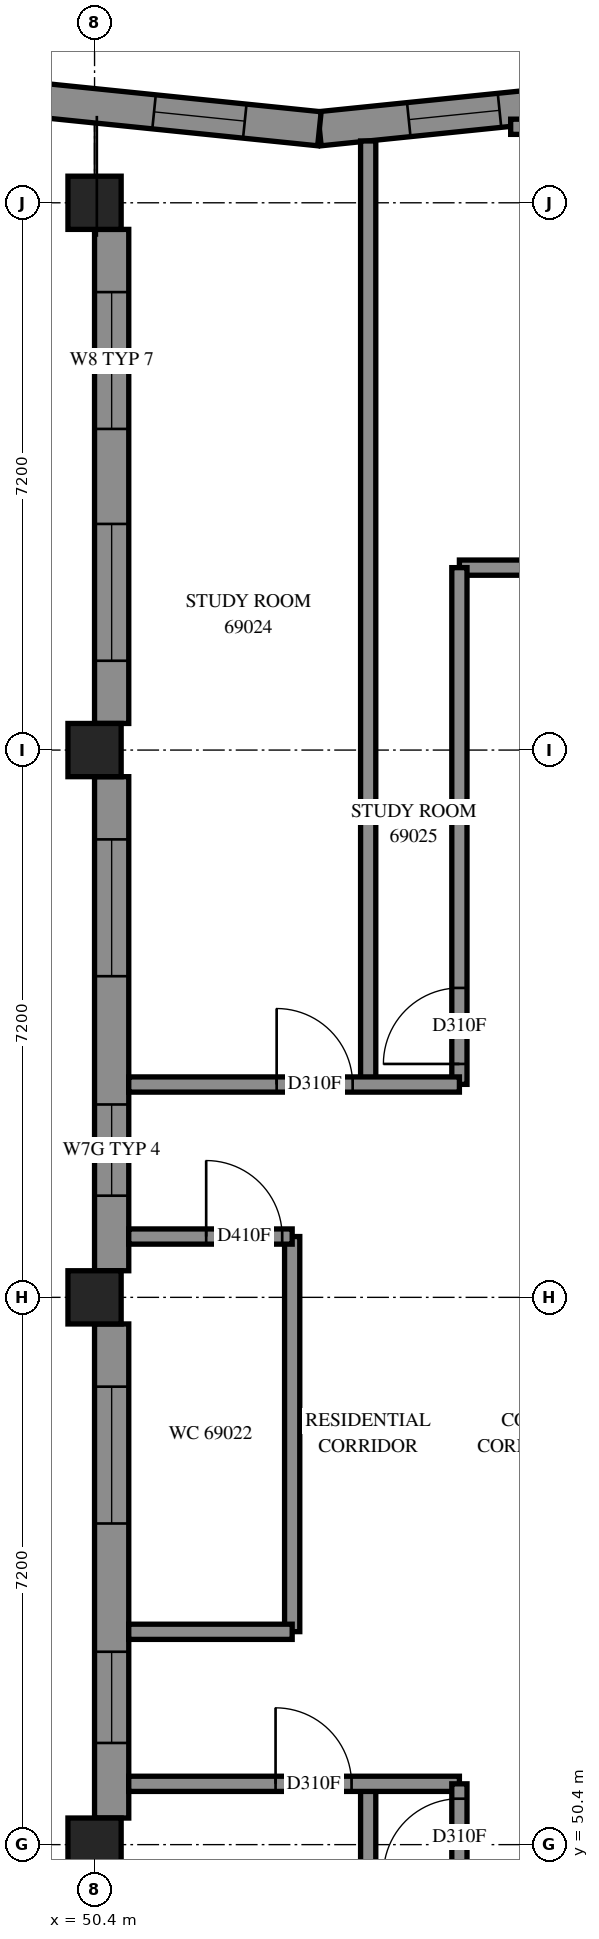
"""IFC4 building model, lengths in metres.
Left out: names, types, materials, properties, quantities, classifications, styles, units other than length and angle.
Written with IfcOpenShell. Run it as: python <this file> out.ifc"""

import sys

from ifc_helpers import new_model, si_unit, direction, frame, frame_2d, origin, origin_2d, place, context, subcontext, project, spatial, polyline, rectangle, outline, extrude, element, fill, save


model = new_model("IFC4")
c1 = context("Model", 3, precision=1e-05, world=origin(), true_north=direction((0.0, 1.0)))
c2 = subcontext(c1, "Body", "Model", "MODEL_VIEW")
j1 = project(units=[si_unit("LENGTHUNIT", "METRE"), si_unit("PLANEANGLEUNIT", "RADIAN")], contexts=[c1])
p1 = place(None, origin())
s1 = spatial("IfcSite", under=j1, at=p1, CompositionType="ELEMENT")
p2 = place(p1, origin())
s2 = spatial("IfcBuilding", under=s1, at=p2, CompositionType="ELEMENT")
p3 = place(p2, frame((0.0, 0.0, 254.0)))
s3 = spatial("IfcBuildingStorey", under=s2, at=p3, CompositionType="ELEMENT", Elevation=254.0)
for number, where, z_axis, x_axis in (
    (1, (50.4, 50.4, 0.0), (0.0, 0.0, 1.0), (1.0, 0.0, 0.0)),
    (2, (50.4, 57.6, 0.0), (0.0, 0.0, 1.0), (1.0, 0.0, 0.0)),
    (3, (50.4, 64.8, 0.0), (0.0, 0.0, 1.0), (1.0, 0.0, 0.0)),
    (4, (50.4, 72.0, 0.0), (0.0, 0.0, 1.0), (1.0, 0.0, 0.0)),
):
    element("IfcColumn", number, at=place(p3, frame(where, z_axis=z_axis, x_axis=x_axis)), inside=s3, PredefinedType="COLUMN", context=c2, shape_type="SweptSolid", body=[
        extrude(rectangle(XDim=0.7, YDim=0.7, at=origin_2d()), origin(), (0.0, 0.0, 1.0), 3.1),
    ])
p4 = place(p3, frame((57.18, 73.365, 0.0), z_axis=(0.0, 0.0, 1.0), x_axis=(-0.9948059356, -0.1017897367, 0.0)))
e5 = element("IfcWall", 5, at=p4, inside=s3, PredefinedType="SOLIDWALL", context=c2, shape_type="SweptSolid", body=[
    extrude(outline(polyline([(-0.023, -0.225), (3.818, -0.225), (3.864, 0.225), (0.023, 0.225), (-0.023, -0.225)])), origin(), (0.0, 0.0, 1.0), 3.1),
])
p5 = place(p4, frame((1.46, 0.0, 0.45)))
e6 = element("IfcOpeningElement", 6, at=p5, cuts=e5, PredefinedType="OPENING", context=c2, shape_type="SweptSolid", body=[
    extrude(rectangle(XDim=1.2, YDim=2.55, at=frame_2d((0.6, 1.275))), frame((0.0, 0.235, 0.0), z_axis=(0.0, -1.0, 0.0), x_axis=(1.0, 0.0, 0.0)), (0.0, 0.0, 1.0), 0.47),
])
p6 = place(p3, frame((53.358, 72.974, 0.0), z_axis=(0.0, 0.0, 1.0), x_axis=(-0.9948059356, 0.1017897367, 0.0)))
e7 = element("IfcWall", 7, at=p6, inside=s3, PredefinedType="SOLIDWALL", context=c2, shape_type="SweptSolid", body=[
    extrude(outline(polyline([(0.023, -0.225), (3.864, -0.225), (3.818, 0.225), (-0.023, 0.225), (0.023, -0.225)])), origin(), (0.0, 0.0, 1.0), 3.1),
])
p7 = place(p6, frame((0.987, 0.0, 0.45)))
e8 = element("IfcOpeningElement", 8, at=p7, cuts=e7, PredefinedType="OPENING", context=c2, shape_type="SweptSolid", body=[
    extrude(rectangle(XDim=1.2, YDim=2.55, at=frame_2d((0.6, 1.275))), frame((0.0, 0.235, 0.0), z_axis=(0.0, -1.0, 0.0), x_axis=(1.0, 0.0, 0.0)), (0.0, 0.0, 1.0), 0.47),
])
p8 = place(p3, frame((50.625, 71.65, 0.0), z_axis=(0.0, 0.0, 1.0), x_axis=(0.0, -1.0, 0.0)))
e9 = element("IfcWall", 9, at=p8, inside=s3, PredefinedType="SOLIDWALL", context=c2, shape_type="SweptSolid", body=[
    extrude(rectangle(XDim=6.5, YDim=0.45, at=frame_2d((3.25, 0.0))), origin(), (0.0, 0.0, 1.0), 3.1),
])
p9 = place(p8, frame((0.825, 0.0, 0.7)))
e10 = element("IfcOpeningElement", 10, at=p9, cuts=e9, PredefinedType="OPENING", context=c2, shape_type="SweptSolid", body=[
    extrude(rectangle(XDim=1.8, YDim=1.8, at=frame_2d((0.9, 0.9))), frame((0.0, 0.235, 0.0), z_axis=(0.0, -1.0, 0.0), x_axis=(1.0, 0.0, 0.0)), (0.0, 0.0, 1.0), 0.47),
])
p10 = place(p8, frame((3.875, 0.0, 0.7)))
e11 = element("IfcOpeningElement", 11, at=p10, cuts=e9, PredefinedType="OPENING", context=c2, shape_type="SweptSolid", body=[
    extrude(rectangle(XDim=1.8, YDim=1.8, at=frame_2d((0.9, 0.9))), frame((0.0, 0.235, 0.0), z_axis=(0.0, -1.0, 0.0), x_axis=(1.0, 0.0, 0.0)), (0.0, 0.0, 1.0), 0.47),
])
p11 = place(p3, frame((50.625, 64.45, 0.0), z_axis=(0.0, 0.0, 1.0), x_axis=(0.0, -1.0, 0.0)))
e12 = element("IfcWall", 12, at=p11, inside=s3, PredefinedType="SOLIDWALL", context=c2, shape_type="SweptSolid", body=[
    extrude(rectangle(XDim=6.5, YDim=0.45, at=frame_2d((3.25, 0.0))), origin(), (0.0, 0.0, 1.0), 3.1),
])
p12 = place(p11, frame((0.825, 0.0, 0.7)))
e13 = element("IfcOpeningElement", 13, at=p12, cuts=e12, PredefinedType="OPENING", context=c2, shape_type="SweptSolid", body=[
    extrude(rectangle(XDim=1.8, YDim=1.8, at=frame_2d((0.9, 0.9))), frame((0.0, 0.235, 0.0), z_axis=(0.0, -1.0, 0.0), x_axis=(1.0, 0.0, 0.0)), (0.0, 0.0, 1.0), 0.47),
])
p13 = place(p11, frame((4.312, 0.0, 0.6)))
e14 = element("IfcOpeningElement", 14, at=p13, cuts=e12, PredefinedType="OPENING", context=c2, shape_type="SweptSolid", body=[
    extrude(rectangle(XDim=1.2, YDim=1.9, at=frame_2d((0.6, 0.95))), frame((0.0, 0.235, 0.0), z_axis=(0.0, -1.0, 0.0), x_axis=(1.0, 0.0, 0.0)), (0.0, 0.0, 1.0), 0.47),
])
p14 = place(p3, frame((50.625, 57.25, 0.0), z_axis=(0.0, 0.0, 1.0), x_axis=(0.0, -1.0, 0.0)))
e15 = element("IfcWall", 15, at=p14, inside=s3, PredefinedType="SOLIDWALL", context=c2, shape_type="SweptSolid", body=[
    extrude(rectangle(XDim=6.5, YDim=0.45, at=frame_2d((3.25, 0.0))), origin(), (0.0, 0.0, 1.0), 3.1),
])
p15 = place(p14, frame((0.825, 0.0, 0.7)))
e16 = element("IfcOpeningElement", 16, at=p15, cuts=e15, PredefinedType="OPENING", context=c2, shape_type="SweptSolid", body=[
    extrude(rectangle(XDim=1.8, YDim=1.8, at=frame_2d((0.9, 0.9))), frame((0.0, 0.235, 0.0), z_axis=(0.0, -1.0, 0.0), x_axis=(1.0, 0.0, 0.0)), (0.0, 0.0, 1.0), 0.47),
])
p16 = place(p14, frame((4.312, 0.0, 0.6)))
e17 = element("IfcOpeningElement", 17, at=p16, cuts=e15, PredefinedType="OPENING", context=c2, shape_type="SweptSolid", body=[
    extrude(rectangle(XDim=1.2, YDim=1.9, at=frame_2d((0.6, 0.95))), frame((0.0, 0.235, 0.0), z_axis=(0.0, -1.0, 0.0), x_axis=(1.0, 0.0, 0.0)), (0.0, 0.0, 1.0), 0.47),
])
p17 = place(p3, frame((55.2, 67.2, 0.0), z_axis=(0.0, 0.0, 1.0), x_axis=(1.0, 0.0, 0.0)))
e18 = element("IfcWall", 18, at=p17, inside=s3, PredefinedType="PARTITIONING", context=c2, shape_type="SweptSolid", body=[
    extrude(rectangle(XDim=19.2, YDim=0.2, at=frame_2d((9.6, 0.0))), origin(), (0.0, 0.0, 1.0), 3.1),
])
p18 = place(p17, frame((4.475, 0.0, 0.0)))
e19 = element("IfcOpeningElement", 19, at=p18, cuts=e18, PredefinedType="OPENING", context=c2, shape_type="SweptSolid", body=[
    extrude(rectangle(XDim=1.0, YDim=2.1, at=frame_2d((0.5, 1.05))), frame((0.0, 0.11, 0.0), z_axis=(0.0, -1.0, 0.0), x_axis=(1.0, 0.0, 0.0)), (0.0, 0.0, 1.0), 0.22),
])
p19 = place(p17, frame((8.301, 0.0, 0.0)))
e20 = element("IfcOpeningElement", 20, at=p19, cuts=e18, PredefinedType="OPENING", context=c2, shape_type="SweptSolid", body=[
    extrude(rectangle(XDim=0.9, YDim=2.1, at=frame_2d((0.45, 1.05))), frame((0.0, 0.11, 0.0), z_axis=(0.0, -1.0, 0.0), x_axis=(1.0, 0.0, 0.0)), (0.0, 0.0, 1.0), 0.22),
])
p20 = place(p17, frame((13.88, 0.0, 0.0)))
e21 = element("IfcOpeningElement", 21, at=p20, cuts=e18, PredefinedType="OPENING", context=c2, shape_type="SweptSolid", body=[
    extrude(rectangle(XDim=1.0, YDim=2.1, at=frame_2d((0.5, 1.05))), frame((0.0, 0.11, 0.0), z_axis=(0.0, -1.0, 0.0), x_axis=(1.0, 0.0, 0.0)), (0.0, 0.0, 1.0), 0.22),
])
p21 = place(p3, frame((54.0, 60.4, 0.0), z_axis=(0.0, 0.0, 1.0), x_axis=(0.0, 1.0, 0.0)))
e22 = element("IfcWall", 22, at=p21, inside=s3, PredefinedType="PARTITIONING", context=c2, shape_type="SweptSolid", body=[
    extrude(rectangle(XDim=12.413, YDim=0.2, at=frame_2d((6.207, 0.0))), origin(), (0.0, 0.0, 1.0), 3.1),
])
p22 = place(p3, frame((54.0, 42.321, 0.0), z_axis=(0.0, 0.0, 1.0), x_axis=(0.0, 1.0, 0.0)))
e23 = element("IfcWall", 23, at=p22, inside=s3, PredefinedType="PARTITIONING", context=c2, shape_type="SweptSolid", body=[
    extrude(rectangle(XDim=8.879, YDim=0.2, at=frame_2d((4.439, 0.0))), origin(), (0.0, 0.0, 1.0), 3.1),
])
p23 = place(p3, frame((55.2, 60.402, 0.0), z_axis=(0.0, 0.0, 1.0), x_axis=(0.0, 1.0, 0.0)))
e24 = element("IfcWall", 24, at=p23, inside=s3, PredefinedType="PARTITIONING", context=c2, shape_type="SweptSolid", body=[
    extrude(rectangle(XDim=6.798, YDim=0.2, at=frame_2d((3.399, 0.0))), origin(), (0.0, 0.0, 1.0), 3.1),
])
p24 = place(p23, frame((0.269, 0.0, 0.0)))
e25 = element("IfcOpeningElement", 25, at=p24, cuts=e24, PredefinedType="OPENING", context=c2, shape_type="SweptSolid", body=[
    extrude(rectangle(XDim=1.0, YDim=2.1, at=frame_2d((0.5, 1.05))), frame((0.0, 0.11, 0.0), z_axis=(0.0, -1.0, 0.0), x_axis=(1.0, 0.0, 0.0)), (0.0, 0.0, 1.0), 0.22),
])
p25 = place(p3, frame((53.0, 53.202, 0.0), z_axis=(0.0, 0.0, 1.0), x_axis=(0.0, 1.0, 0.0)))
e26 = element("IfcWall", 26, at=p25, inside=s3, PredefinedType="PARTITIONING", context=c2, shape_type="SweptSolid", body=[
    extrude(rectangle(XDim=5.198, YDim=0.2, at=frame_2d((2.599, 0.0))), origin(), (0.0, 0.0, 1.0), 3.1),
])
p26 = place(p3, frame((50.85, 51.2, 0.0), z_axis=(0.0, 0.0, 1.0), x_axis=(1.0, 0.0, 0.0)))
e27 = element("IfcWall", 27, at=p26, inside=s3, PredefinedType="PARTITIONING", context=c2, shape_type="SweptSolid", body=[
    extrude(rectangle(XDim=4.35, YDim=0.2, at=frame_2d((2.175, 0.0))), origin(), (0.0, 0.0, 1.0), 3.1),
])
p27 = place(p26, frame((1.931, 0.0, 0.0)))
e28 = element("IfcOpeningElement", 28, at=p27, cuts=e27, PredefinedType="OPENING", context=c2, shape_type="SweptSolid", body=[
    extrude(rectangle(XDim=1.0, YDim=2.1, at=frame_2d((0.5, 1.05))), frame((0.0, 0.11, 0.0), z_axis=(0.0, -1.0, 0.0), x_axis=(1.0, 0.0, 0.0)), (0.0, 0.0, 1.0), 0.22),
])
p28 = place(p3, frame((50.85, 60.4, 0.0), z_axis=(0.0, 0.0, 1.0), x_axis=(1.0, 0.0, 0.0)))
e29 = element("IfcWall", 29, at=p28, inside=s3, PredefinedType="PARTITIONING", context=c2, shape_type="SweptSolid", body=[
    extrude(rectangle(XDim=4.35, YDim=0.2, at=frame_2d((2.175, 0.0))), origin(), (0.0, 0.0, 1.0), 3.1),
])
p29 = place(p28, frame((1.946, 0.0, 0.0)))
e30 = element("IfcOpeningElement", 30, at=p29, cuts=e29, PredefinedType="OPENING", context=c2, shape_type="SweptSolid", body=[
    extrude(rectangle(XDim=1.0, YDim=2.1, at=frame_2d((0.5, 1.05))), frame((0.0, 0.11, 0.0), z_axis=(0.0, -1.0, 0.0), x_axis=(1.0, 0.0, 0.0)), (0.0, 0.0, 1.0), 0.22),
])
p30 = place(p3, frame((55.2, 48.0, 0.0), z_axis=(0.0, 0.0, 1.0), x_axis=(0.0, 1.0, 0.0)))
e31 = element("IfcWall", 31, at=p30, inside=s3, PredefinedType="PARTITIONING", context=c2, shape_type="SweptSolid", body=[
    extrude(rectangle(XDim=3.2, YDim=0.2, at=frame_2d((1.6, 0.0))), origin(), (0.0, 0.0, 1.0), 3.1),
])
p31 = place(p30, frame((2.004, 0.0, 0.0)))
e32 = element("IfcOpeningElement", 32, at=p31, cuts=e31, PredefinedType="OPENING", context=c2, shape_type="SweptSolid", body=[
    extrude(rectangle(XDim=1.0, YDim=2.1, at=frame_2d((0.5, 1.05))), frame((0.0, 0.11, 0.0), z_axis=(0.0, -1.0, 0.0), x_axis=(1.0, 0.0, 0.0)), (0.0, 0.0, 1.0), 0.22),
])
p32 = place(p3, frame((55.875, 73.0, 0.0), z_axis=(0.0, 0.0, 1.0), x_axis=(1.0, 0.0, 0.0)))
e33 = element("IfcWall", 33, at=p32, inside=s3, PredefinedType="PARTITIONING", context=c2, shape_type="SweptSolid", body=[
    extrude(rectangle(XDim=2.61, YDim=0.2, at=frame_2d((1.305, 0.0))), origin(), (0.0, 0.0, 1.0), 3.1),
])
p33 = place(p3, frame((50.85, 53.2, 0.0), z_axis=(0.0, 0.0, 1.0), x_axis=(1.0, 0.0, 0.0)))
e34 = element("IfcWall", 34, at=p33, inside=s3, PredefinedType="PARTITIONING", context=c2, shape_type="SweptSolid", body=[
    extrude(rectangle(XDim=2.15, YDim=0.2, at=frame_2d((1.075, 0.0))), origin(), (0.0, 0.0, 1.0), 3.1),
])
p34 = place(p3, frame((50.85, 58.4, 0.0), z_axis=(0.0, 0.0, 1.0), x_axis=(1.0, 0.0, 0.0)))
e35 = element("IfcWall", 35, at=p34, inside=s3, PredefinedType="PARTITIONING", context=c2, shape_type="SweptSolid", body=[
    extrude(rectangle(XDim=2.15, YDim=0.2, at=frame_2d((1.075, 0.0))), origin(), (0.0, 0.0, 1.0), 3.1),
])
p35 = place(p34, frame((1.019, 0.0, 0.0)))
e36 = element("IfcOpeningElement", 36, at=p35, cuts=e35, PredefinedType="OPENING", context=c2, shape_type="SweptSolid", body=[
    extrude(rectangle(XDim=1.0, YDim=2.1, at=frame_2d((0.5, 1.05))), frame((0.0, 0.11, 0.0), z_axis=(0.0, -1.0, 0.0), x_axis=(1.0, 0.0, 0.0)), (0.0, 0.0, 1.0), 0.22),
])
p36 = place(p5, origin())
e37 = element("IfcWindow", 37, at=p36, inside=s3, PartitioningType="SINGLE_PANEL", PredefinedType="WINDOW", context=c2, shape_type="SweptSolid", body=[
    extrude(rectangle(XDim=1.2, YDim=2.55, at=frame_2d((0.6, 1.275))), frame((0.0, 0.205, 0.0), z_axis=(0.0, -1.0, 0.0), x_axis=(1.0, 0.0, 0.0)), (0.0, 0.0, 1.0), 0.06),
])
fill(e6, e37)
p37 = place(p7, origin())
e38 = element("IfcWindow", 38, at=p37, inside=s3, PartitioningType="SINGLE_PANEL", PredefinedType="WINDOW", context=c2, shape_type="SweptSolid", body=[
    extrude(rectangle(XDim=1.2, YDim=2.55, at=frame_2d((0.6, 1.275))), frame((0.0, 0.205, 0.0), z_axis=(0.0, -1.0, 0.0), x_axis=(1.0, 0.0, 0.0)), (0.0, 0.0, 1.0), 0.06),
])
fill(e8, e38)
p38 = place(p9, origin())
e39 = element("IfcWindow", 39, at=p38, inside=s3, PartitioningType="SINGLE_PANEL", PredefinedType="WINDOW", context=c2, shape_type="SweptSolid", body=[
    extrude(rectangle(XDim=1.8, YDim=1.8, at=frame_2d((0.9, 0.9))), frame((0.0, 0.205, 0.0), z_axis=(0.0, -1.0, 0.0), x_axis=(1.0, 0.0, 0.0)), (0.0, 0.0, 1.0), 0.06),
])
fill(e10, e39)
p39 = place(p10, origin())
e40 = element("IfcWindow", 40, at=p39, inside=s3, PartitioningType="SINGLE_PANEL", PredefinedType="WINDOW", context=c2, shape_type="SweptSolid", body=[
    extrude(rectangle(XDim=1.8, YDim=1.8, at=frame_2d((0.9, 0.9))), frame((0.0, 0.205, 0.0), z_axis=(0.0, -1.0, 0.0), x_axis=(1.0, 0.0, 0.0)), (0.0, 0.0, 1.0), 0.06),
])
fill(e11, e40)
p40 = place(p12, origin())
e41 = element("IfcWindow", 41, at=p40, inside=s3, PartitioningType="SINGLE_PANEL", PredefinedType="WINDOW", context=c2, shape_type="SweptSolid", body=[
    extrude(rectangle(XDim=1.8, YDim=1.8, at=frame_2d((0.9, 0.9))), frame((0.0, 0.205, 0.0), z_axis=(0.0, -1.0, 0.0), x_axis=(1.0, 0.0, 0.0)), (0.0, 0.0, 1.0), 0.06),
])
fill(e13, e41)
p41 = place(p15, origin())
e42 = element("IfcWindow", 42, at=p41, inside=s3, PartitioningType="SINGLE_PANEL", PredefinedType="WINDOW", context=c2, shape_type="SweptSolid", body=[
    extrude(rectangle(XDim=1.8, YDim=1.8, at=frame_2d((0.9, 0.9))), frame((0.0, 0.205, 0.0), z_axis=(0.0, -1.0, 0.0), x_axis=(1.0, 0.0, 0.0)), (0.0, 0.0, 1.0), 0.06),
])
fill(e16, e42)
p42 = place(p27, origin())
e43 = element("IfcDoor", 43, at=p42, inside=s3, OperationType="SINGLE_SWING_LEFT", PredefinedType="DOOR", context=c2, shape_type="SweptSolid", body=[
    extrude(rectangle(XDim=1.0, YDim=2.1, at=frame_2d((0.5, 1.05))), frame((0.0, 0.025, 0.0), z_axis=(0.0, -1.0, 0.0), x_axis=(1.0, 0.0, 0.0)), (0.0, 0.0, 1.0), 0.05),
])
fill(e28, e43)
p43 = place(p31, origin())
e44 = element("IfcDoor", 44, at=p43, inside=s3, OperationType="SINGLE_SWING_RIGHT", PredefinedType="DOOR", context=c2, shape_type="SweptSolid", body=[
    extrude(rectangle(XDim=1.0, YDim=2.1, at=frame_2d((0.5, 1.05))), frame((0.0, 0.025, 0.0), z_axis=(0.0, -1.0, 0.0), x_axis=(1.0, 0.0, 0.0)), (0.0, 0.0, 1.0), 0.05),
])
fill(e32, e44)
p44 = place(p35, origin())
e45 = element("IfcDoor", 45, at=p44, inside=s3, OperationType="SINGLE_SWING_LEFT", PredefinedType="DOOR", context=c2, shape_type="SweptSolid", body=[
    extrude(rectangle(XDim=1.0, YDim=2.1, at=frame_2d((0.5, 1.05))), frame((0.0, 0.025, 0.0), z_axis=(0.0, -1.0, 0.0), x_axis=(1.0, 0.0, 0.0)), (0.0, 0.0, 1.0), 0.05),
])
fill(e36, e45)
p45 = place(p29, origin())
e46 = element("IfcDoor", 46, at=p45, inside=s3, OperationType="SINGLE_SWING_RIGHT", PredefinedType="DOOR", context=c2, shape_type="SweptSolid", body=[
    extrude(rectangle(XDim=1.0, YDim=2.1, at=frame_2d((0.5, 1.05))), frame((0.0, 0.025, 0.0), z_axis=(0.0, -1.0, 0.0), x_axis=(1.0, 0.0, 0.0)), (0.0, 0.0, 1.0), 0.05),
])
fill(e30, e46)
p46 = place(p24, origin())
e47 = element("IfcDoor", 47, at=p46, inside=s3, OperationType="SINGLE_SWING_LEFT", PredefinedType="DOOR", context=c2, shape_type="SweptSolid", body=[
    extrude(rectangle(XDim=1.0, YDim=2.1, at=frame_2d((0.5, 1.05))), frame((0.0, 0.025, 0.0), z_axis=(0.0, -1.0, 0.0), x_axis=(1.0, 0.0, 0.0)), (0.0, 0.0, 1.0), 0.05),
])
fill(e25, e47)
p47 = place(p13, origin())
e48 = element("IfcWindow", 48, at=p47, inside=s3, PartitioningType="SINGLE_PANEL", PredefinedType="WINDOW", context=c2, shape_type="SweptSolid", body=[
    extrude(rectangle(XDim=1.2, YDim=1.9, at=frame_2d((0.6, 0.95))), frame((0.0, 0.205, 0.0), z_axis=(0.0, -1.0, 0.0), x_axis=(1.0, 0.0, 0.0)), (0.0, 0.0, 1.0), 0.06),
])
fill(e14, e48)
p48 = place(p16, origin())
e49 = element("IfcWindow", 49, at=p48, inside=s3, PartitioningType="SINGLE_PANEL", PredefinedType="WINDOW", context=c2, shape_type="SweptSolid", body=[
    extrude(rectangle(XDim=1.2, YDim=1.9, at=frame_2d((0.6, 0.95))), frame((0.0, 0.205, 0.0), z_axis=(0.0, -1.0, 0.0), x_axis=(1.0, 0.0, 0.0)), (0.0, 0.0, 1.0), 0.06),
])
fill(e17, e49)
save(model, sys.argv[1])
